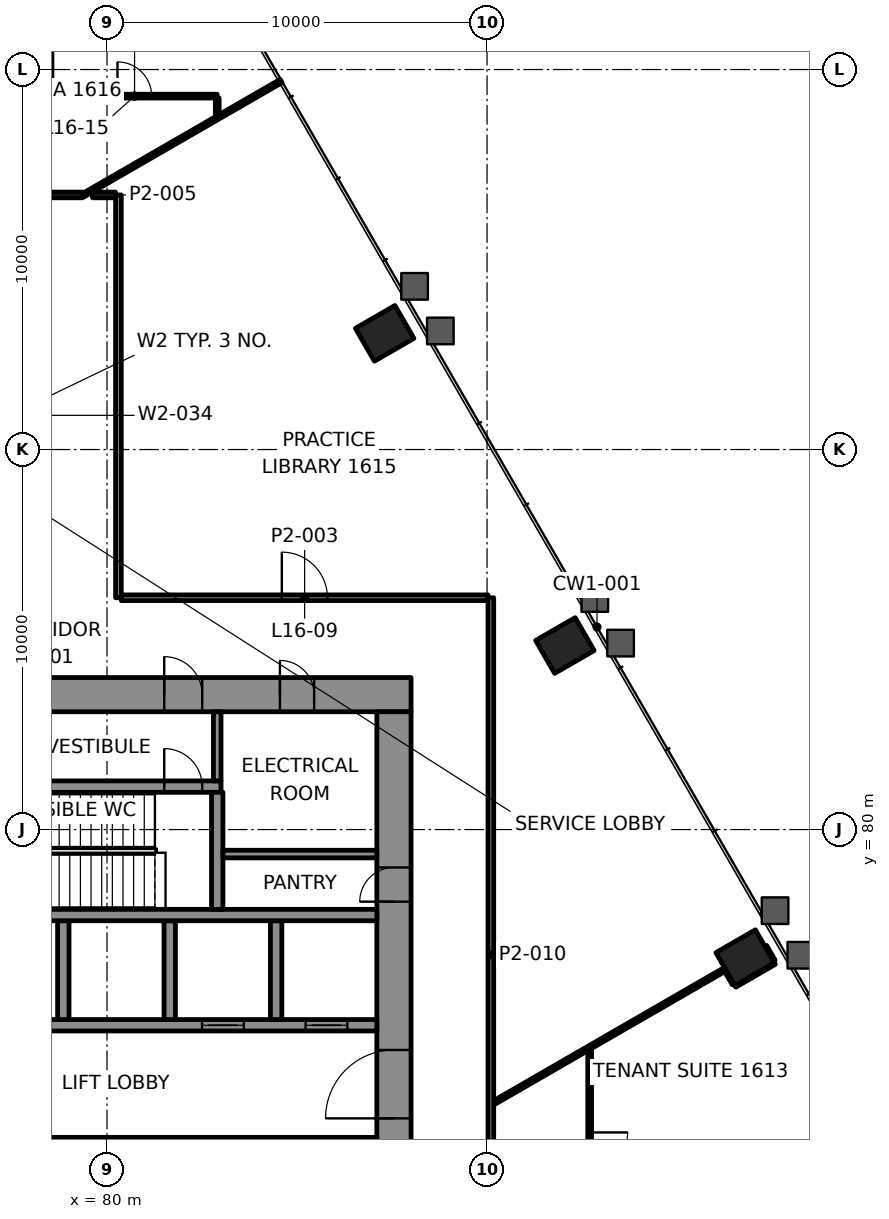
"""IFC4 building model, lengths in metres.
Left out: names, types, materials, properties, quantities, classifications, styles, units other than length and angle.
Written with IfcOpenShell. Run it as: python <this file> out.ifc"""

import sys

from ifc_helpers import new_model, si_unit, direction, frame, frame_2d, origin, origin_2d, place, context, subcontext, project, spatial, rectangle, extrude, element, fill, save


model = new_model("IFC4")
c1 = context("Model", 3, precision=1e-05, world=origin(), true_north=direction((0.0, 1.0)))
c2 = subcontext(c1, "Body", "Model", "MODEL_VIEW")
j1 = project(units=[si_unit("LENGTHUNIT", "METRE"), si_unit("PLANEANGLEUNIT", "RADIAN")], contexts=[c1])
p1 = place(None, origin())
s1 = spatial("IfcSite", under=j1, at=p1, CompositionType="ELEMENT")
p2 = place(p1, origin())
s2 = spatial("IfcBuilding", under=s1, at=p2, CompositionType="ELEMENT")
p3 = place(p2, frame((0.0, 0.0, 73.6)))
s3 = spatial("IfcBuildingStorey", under=s2, at=p3, CompositionType="ELEMENT", Elevation=73.6)
for number, where, z_axis, x_axis in (
    (1, (96.791, 76.628, -0.0), (0.0, 0.0, 1.0), (-0.5, 0.866, 0.0)),
    (2, (92.049, 84.843, -0.0), (0.0, 0.0, 1.0), (-0.5, 0.866, 0.0)),
    (3, (87.306, 93.057, -0.0), (0.0, 0.0, 1.0), (-0.5, 0.866, 0.0)),
):
    element("IfcColumn", number, at=place(p3, frame(where, z_axis=z_axis, x_axis=x_axis)), inside=s3, PredefinedType="COLUMN", context=c2, shape_type="SweptSolid", body=[
        extrude(rectangle(XDim=1.0, YDim=1.2, at=origin_2d()), origin(), (0.0, 0.0, 1.0), 4.2),
    ])
p4 = place(p3, frame((62.0, 83.55, 0.0), z_axis=(0.0, 0.0, 1.0), x_axis=(1.0, 0.0, 0.0)))
e4 = element("IfcWall", 4, at=p4, inside=s3, PredefinedType="SHEAR", context=c2, shape_type="SweptSolid", body=[
    extrude(rectangle(XDim=26.0, YDim=0.9, at=frame_2d((13.0, 0.0))), origin(), (0.0, 0.0, 1.0), 4.0),
])
p5 = place(p4, frame((5.695, 0.0, 0.0)))
e5 = element("IfcOpeningElement", 5, at=p5, cuts=e4, PredefinedType="OPENING", context=c2, shape_type="SweptSolid", body=[
    extrude(rectangle(XDim=1.0, YDim=2.1, at=frame_2d((0.5, 1.05))), frame((0.0, 0.46, 0.0), z_axis=(0.0, -1.0, 0.0), x_axis=(1.0, 0.0, 0.0)), (0.0, 0.0, 1.0), 0.92),
])
p6 = place(p4, frame((19.505, 0.0, 0.0)))
e6 = element("IfcOpeningElement", 6, at=p6, cuts=e4, PredefinedType="OPENING", context=c2, shape_type="SweptSolid", body=[
    extrude(rectangle(XDim=1.0, YDim=2.1, at=frame_2d((0.5, 1.05))), frame((0.0, 0.46, 0.0), z_axis=(0.0, -1.0, 0.0), x_axis=(1.0, 0.0, 0.0)), (0.0, 0.0, 1.0), 0.92),
])
p7 = place(p4, frame((3.45, 0.0, 0.0)))
e7 = element("IfcOpeningElement", 7, at=p7, cuts=e4, PredefinedType="OPENING", context=c2, shape_type="SweptSolid", body=[
    extrude(rectangle(XDim=0.9, YDim=2.1, at=frame_2d((0.45, 1.05))), frame((0.0, 0.46, 0.0), z_axis=(0.0, -1.0, 0.0), x_axis=(1.0, 0.0, 0.0)), (0.0, 0.0, 1.0), 0.92),
])
p8 = place(p4, frame((12.65, 0.0, 0.0)))
e8 = element("IfcOpeningElement", 8, at=p8, cuts=e4, PredefinedType="OPENING", context=c2, shape_type="SweptSolid", body=[
    extrude(rectangle(XDim=0.9, YDim=2.1, at=frame_2d((0.45, 1.05))), frame((0.0, 0.46, 0.0), z_axis=(0.0, -1.0, 0.0), x_axis=(1.0, 0.0, 0.0)), (0.0, 0.0, 1.0), 0.92),
])
p9 = place(p4, frame((22.55, 0.0, 0.0)))
e9 = element("IfcOpeningElement", 9, at=p9, cuts=e4, PredefinedType="OPENING", context=c2, shape_type="SweptSolid", body=[
    extrude(rectangle(XDim=0.9, YDim=2.1, at=frame_2d((0.45, 1.05))), frame((0.0, 0.46, 0.0), z_axis=(0.0, -1.0, 0.0), x_axis=(1.0, 0.0, 0.0)), (0.0, 0.0, 1.0), 0.92),
])
p10 = place(p3, frame((87.55, 66.9, 0.0), z_axis=(0.0, 0.0, 1.0), x_axis=(0.0, 1.0, 0.0)))
e10 = element("IfcWall", 10, at=p10, inside=s3, PredefinedType="SHEAR", context=c2, shape_type="SweptSolid", body=[
    extrude(rectangle(XDim=16.2, YDim=0.9, at=frame_2d((8.1, 0.0))), origin(), (0.0, 0.0, 1.0), 4.0),
])
p11 = place(p10, frame((5.5, 0.0, 0.0)))
e11 = element("IfcOpeningElement", 11, at=p11, cuts=e10, PredefinedType="OPENING", context=c2, shape_type="SweptSolid", body=[
    extrude(rectangle(XDim=1.8, YDim=2.1, at=frame_2d((0.9, 1.05))), frame((0.0, 0.46, 0.0), z_axis=(0.0, -1.0, 0.0), x_axis=(1.0, 0.0, 0.0)), (0.0, 0.0, 1.0), 0.92),
])
p12 = place(p10, frame((11.202, 0.0, 0.0)))
e12 = element("IfcOpeningElement", 12, at=p12, cuts=e10, PredefinedType="OPENING", context=c2, shape_type="SweptSolid", body=[
    extrude(rectangle(XDim=0.9, YDim=2.1, at=frame_2d((0.45, 1.05))), frame((0.0, 0.46, 0.0), z_axis=(0.0, -1.0, 0.0), x_axis=(1.0, 0.0, 0.0)), (0.0, 0.0, 1.0), 0.92),
])
p13 = place(p3, frame((70.3, 71.75, 0.0), z_axis=(0.0, 0.0, 1.0), x_axis=(1.0, 0.0, 0.0)))
e13 = element("IfcWall", 13, at=p13, inside=s3, PredefinedType="SHEAR", context=c2, shape_type="SweptSolid", body=[
    extrude(rectangle(XDim=16.8, YDim=0.3, at=frame_2d((8.4, 0.0))), origin(), (0.0, 0.0, 1.0), 4.0),
])
p14 = place(p13, frame((1.0, 0.0, 0.0)))
e14 = element("IfcOpeningElement", 14, at=p14, cuts=e13, PredefinedType="OPENING", context=c2, shape_type="SweptSolid", body=[
    extrude(rectangle(XDim=1.1, YDim=2.1, at=frame_2d((0.55, 1.05))), frame((0.0, 0.16, 0.0), z_axis=(0.0, -1.0, 0.0), x_axis=(1.0, 0.0, 0.0)), (0.0, 0.0, 1.0), 0.32),
])
p15 = place(p13, frame((3.8, 0.0, 0.0)))
e15 = element("IfcOpeningElement", 15, at=p15, cuts=e13, PredefinedType="OPENING", context=c2, shape_type="SweptSolid", body=[
    extrude(rectangle(XDim=1.1, YDim=2.1, at=frame_2d((0.55, 1.05))), frame((0.0, 0.16, 0.0), z_axis=(0.0, -1.0, 0.0), x_axis=(1.0, 0.0, 0.0)), (0.0, 0.0, 1.0), 0.32),
])
p16 = place(p13, frame((6.6, 0.0, 0.0)))
e16 = element("IfcOpeningElement", 16, at=p16, cuts=e13, PredefinedType="OPENING", context=c2, shape_type="SweptSolid", body=[
    extrude(rectangle(XDim=1.1, YDim=2.1, at=frame_2d((0.55, 1.05))), frame((0.0, 0.16, 0.0), z_axis=(0.0, -1.0, 0.0), x_axis=(1.0, 0.0, 0.0)), (0.0, 0.0, 1.0), 0.32),
])
p17 = place(p13, frame((9.4, 0.0, 0.0)))
e17 = element("IfcOpeningElement", 17, at=p17, cuts=e13, PredefinedType="OPENING", context=c2, shape_type="SweptSolid", body=[
    extrude(rectangle(XDim=1.1, YDim=2.1, at=frame_2d((0.55, 1.05))), frame((0.0, 0.16, 0.0), z_axis=(0.0, -1.0, 0.0), x_axis=(1.0, 0.0, 0.0)), (0.0, 0.0, 1.0), 0.32),
])
p18 = place(p13, frame((12.2, 0.0, 0.0)))
e18 = element("IfcOpeningElement", 18, at=p18, cuts=e13, PredefinedType="OPENING", context=c2, shape_type="SweptSolid", body=[
    extrude(rectangle(XDim=1.1, YDim=2.1, at=frame_2d((0.55, 1.05))), frame((0.0, 0.16, 0.0), z_axis=(0.0, -1.0, 0.0), x_axis=(1.0, 0.0, 0.0)), (0.0, 0.0, 1.0), 0.32),
])
p19 = place(p13, frame((14.925, 0.0, 0.0)))
e19 = element("IfcOpeningElement", 19, at=p19, cuts=e13, PredefinedType="OPENING", context=c2, shape_type="SweptSolid", body=[
    extrude(rectangle(XDim=1.1, YDim=2.1, at=frame_2d((0.55, 1.05))), frame((0.0, 0.16, 0.0), z_axis=(0.0, -1.0, 0.0), x_axis=(1.0, 0.0, 0.0)), (0.0, 0.0, 1.0), 0.32),
])
p20 = place(p3, frame((70.3, 74.85, 0.0), z_axis=(0.0, 0.0, 1.0), x_axis=(1.0, 0.0, 0.0)))
e20 = element("IfcWall", 20, at=p20, inside=s3, PredefinedType="SHEAR", context=c2, shape_type="SweptSolid", body=[
    extrude(rectangle(XDim=16.8, YDim=0.3, at=frame_2d((8.4, 0.0))), origin(), (0.0, 0.0, 1.0), 4.0),
])
p21 = place(p20, frame((3.8, 0.0, 0.0)))
e21 = element("IfcOpeningElement", 21, at=p21, cuts=e20, PredefinedType="OPENING", context=c2, shape_type="SweptSolid", body=[
    extrude(rectangle(XDim=1.1, YDim=2.1, at=frame_2d((0.55, 1.05))), frame((0.0, 0.16, 0.0), z_axis=(0.0, -1.0, 0.0), x_axis=(1.0, 0.0, 0.0)), (0.0, 0.0, 1.0), 0.32),
])
p22 = place(p20, frame((12.2, 0.0, 0.0)))
e22 = element("IfcOpeningElement", 22, at=p22, cuts=e20, PredefinedType="OPENING", context=c2, shape_type="SweptSolid", body=[
    extrude(rectangle(XDim=1.1, YDim=2.1, at=frame_2d((0.55, 1.05))), frame((0.0, 0.16, 0.0), z_axis=(0.0, -1.0, 0.0), x_axis=(1.0, 0.0, 0.0)), (0.0, 0.0, 1.0), 0.32),
])
p23 = place(p20, frame((14.925, 0.0, 0.0)))
e23 = element("IfcOpeningElement", 23, at=p23, cuts=e20, PredefinedType="OPENING", context=c2, shape_type="SweptSolid", body=[
    extrude(rectangle(XDim=1.1, YDim=2.1, at=frame_2d((0.55, 1.05))), frame((0.0, 0.16, 0.0), z_axis=(0.0, -1.0, 0.0), x_axis=(1.0, 0.0, 0.0)), (0.0, 0.0, 1.0), 0.32),
])
for number, where, z_axis, x_axis in (
    (24, (78.85, 75.0, 0.0), (0.0, 0.0, 1.0), (0.0, 1.0, 0.0)),
    (25, (81.65, 75.0, 0.0), (0.0, 0.0, 1.0), (0.0, 1.0, 0.0)),
    (26, (84.45, 75.0, 0.0), (0.0, 0.0, 1.0), (0.0, 1.0, 0.0)),
):
    element("IfcWall", number, at=place(p3, frame(where, z_axis=z_axis, x_axis=x_axis)), inside=s3, PredefinedType="SHEAR", context=c2, shape_type="SweptSolid", body=[
        extrude(rectangle(XDim=2.6, YDim=0.3, at=frame_2d((1.3, 0.0))), origin(), (0.0, 0.0, 1.0), 4.0),
    ])
p24 = place(p3, frame((64.35, 77.75, 0.0), z_axis=(0.0, 0.0, 1.0), x_axis=(1.0, 0.0, 0.0)))
e27 = element("IfcWall", 27, at=p24, inside=s3, PredefinedType="SHEAR", context=c2, shape_type="SweptSolid", body=[
    extrude(rectangle(XDim=22.75, YDim=0.3, at=frame_2d((11.375, 0.0))), origin(), (0.0, 0.0, 1.0), 4.0),
])
p25 = place(p24, frame((3.345, 0.0, 0.0)))
e28 = element("IfcOpeningElement", 28, at=p25, cuts=e27, PredefinedType="OPENING", context=c2, shape_type="SweptSolid", body=[
    extrude(rectangle(XDim=1.0, YDim=2.1, at=frame_2d((0.5, 1.05))), frame((0.0, 0.16, 0.0), z_axis=(0.0, -1.0, 0.0), x_axis=(1.0, 0.0, 0.0)), (0.0, 0.0, 1.0), 0.32),
])
p26 = place(p3, frame((76.14, 81.13, 0.0), z_axis=(0.0, 0.0, 1.0), x_axis=(1.0, 0.0, 0.0)))
e29 = element("IfcWall", 29, at=p26, inside=s3, PredefinedType="SHEAR", context=c2, shape_type="SweptSolid", body=[
    extrude(rectangle(XDim=6.86, YDim=0.3, at=frame_2d((3.43, 0.0))), origin(), (0.0, 0.0, 1.0), 4.0),
])
p27 = place(p26, frame((5.365, 0.0, 0.0)))
e30 = element("IfcOpeningElement", 30, at=p27, cuts=e29, PredefinedType="OPENING", context=c2, shape_type="SweptSolid", body=[
    extrude(rectangle(XDim=1.0, YDim=2.1, at=frame_2d((0.5, 1.05))), frame((0.0, 0.16, 0.0), z_axis=(0.0, -1.0, 0.0), x_axis=(1.0, 0.0, 0.0)), (0.0, 0.0, 1.0), 0.32),
])
p28 = place(p3, frame((82.9, 77.9, 0.0), z_axis=(0.0, 0.0, 1.0), x_axis=(0.0, 1.0, 0.0)))
e31 = element("IfcWall", 31, at=p28, inside=s3, PredefinedType="SHEAR", context=c2, shape_type="SweptSolid", body=[
    extrude(rectangle(XDim=3.08, YDim=0.3, at=frame_2d((1.54, 0.0))), origin(), (0.0, 0.0, 1.0), 4.0),
])
p29 = place(p3, frame((80.375, 86.1, 0.0), z_axis=(0.0, 0.0, 1.0), x_axis=(1.0, 0.0, 0.0)))
e32 = element("IfcWall", 32, at=p29, inside=s3, PredefinedType="PARTITIONING", context=c2, shape_type="SweptSolid", body=[
    extrude(rectangle(XDim=9.649, YDim=0.15, at=frame_2d((4.825, 0.0))), origin(), (0.0, 0.0, 1.0), 3.4),
])
p30 = place(p29, frame((4.225, 0.0, 0.0)))
e33 = element("IfcOpeningElement", 33, at=p30, cuts=e32, PredefinedType="OPENING", context=c2, shape_type="SweptSolid", body=[
    extrude(rectangle(XDim=1.2, YDim=2.1, at=frame_2d((0.6, 1.05))), frame((0.0, 0.085, 0.0), z_axis=(0.0, -1.0, 0.0), x_axis=(1.0, 0.0, 0.0)), (0.0, 0.0, 1.0), 0.17),
])
p31 = place(p3, frame((75.975, 96.7, 0.0), z_axis=(0.0, 0.0, 1.0), x_axis=(1.0, 0.0, 0.0)))
e34 = element("IfcWall", 34, at=p31, inside=s3, PredefinedType="PARTITIONING", context=c2, shape_type="SweptSolid", body=[
    extrude(rectangle(XDim=3.387, YDim=0.15, at=frame_2d((1.693, 0.0))), origin(), (0.0, 0.0, 1.0), 3.4),
])
p32 = place(p31, frame((1.194, 0.0, 0.0)))
e35 = element("IfcOpeningElement", 35, at=p32, cuts=e34, PredefinedType="OPENING", context=c2, shape_type="SweptSolid", body=[
    extrude(rectangle(XDim=1.0, YDim=2.1, at=frame_2d((0.5, 1.05))), frame((0.0, 0.085, 0.0), z_axis=(0.0, -1.0, 0.0), x_axis=(1.0, 0.0, 0.0)), (0.0, 0.0, 1.0), 0.17),
])
p33 = place(p3, frame((78.55, 99.3, 0.0), z_axis=(0.0, 0.0, 1.0), x_axis=(1.0, 0.0, 0.0)))
e36 = element("IfcWall", 36, at=p33, inside=s3, PredefinedType="PARTITIONING", context=c2, shape_type="SweptSolid", body=[
    extrude(rectangle(XDim=4.349, YDim=0.1, at=frame_2d((2.175, 0.0))), origin(), (0.0, 0.0, 1.0), 3.4),
])
p34 = place(p33, frame((1.725, 0.0, 0.0)))
e37 = element("IfcOpeningElement", 37, at=p34, cuts=e36, PredefinedType="OPENING", context=c2, shape_type="SweptSolid", body=[
    extrude(rectangle(XDim=0.9, YDim=2.1, at=frame_2d((0.45, 1.05))), frame((0.0, 0.06, 0.0), z_axis=(0.0, -1.0, 0.0), x_axis=(1.0, 0.0, 0.0)), (0.0, 0.0, 1.0), 0.12),
])
p35 = place(p3, frame((96.522, 75.896, 0.0), z_axis=(0.0, 0.0, 1.0), x_axis=(0.865978732077, 0.500080829057, 0.0)))
e38 = element("IfcWall", 38, at=p35, inside=s3, PredefinedType="PARTITIONING", context=c2, shape_type="SweptSolid", body=[
    extrude(rectangle(XDim=1.199, YDim=0.1, at=frame_2d((0.6, 0.0))), origin(), (0.0, 0.0, 1.0), 3.165),
])
p36 = place(p3, frame((90.201, 72.824, 0.0), z_axis=(0.0, 0.0, 1.0), x_axis=(0.866028979627, 0.499993806408, 0.0)))
e39 = element("IfcWall", 39, at=p36, inside=s3, PredefinedType="PARTITIONING", context=c2, shape_type="SweptSolid", body=[
    extrude(rectangle(XDim=7.009, YDim=0.1, at=frame_2d((3.505, 0.0))), origin(), (0.0, 0.0, 1.0), 3.4),
])
p37 = place(p3, frame((79.387, 96.7, 0.0), z_axis=(0.0, 0.0, 1.0), x_axis=(0.866032365835, 0.499987941182, 0.0)))
e40 = element("IfcWall", 40, at=p37, inside=s3, PredefinedType="PARTITIONING", context=c2, shape_type="SweptSolid", body=[
    extrude(rectangle(XDim=5.997, YDim=0.1, at=frame_2d((2.999, 0.0))), origin(), (0.0, 0.0, 1.0), 3.165),
])
p38 = place(p3, frame((92.7, 74.179, 0.0), z_axis=(0.0, 0.0, 1.0), x_axis=(0.0, -1.0, 0.0)))
e41 = element("IfcWall", 41, at=p38, inside=s3, PredefinedType="PARTITIONING", context=c2, shape_type="SweptSolid", body=[
    extrude(rectangle(XDim=5.299, YDim=0.1, at=frame_2d((2.649, 0.0))), origin(), (0.0, 0.0, 1.0), 3.4),
])
p39 = place(p38, frame((2.149, 0.0, 0.0)))
e42 = element("IfcOpeningElement", 42, at=p39, cuts=e41, PredefinedType="OPENING", context=c2, shape_type="SweptSolid", body=[
    extrude(rectangle(XDim=1.0, YDim=2.1, at=frame_2d((0.5, 1.05))), frame((0.0, 0.06, 0.0), z_axis=(0.0, -1.0, 0.0), x_axis=(1.0, 0.0, 0.0)), (0.0, 0.0, 1.0), 0.12),
])
p40 = place(p3, frame((90.1, 86.099, 0.0), z_axis=(0.0, 0.0, 1.0), x_axis=(0.0, -1.0, 0.0)))
e43 = element("IfcWall", 43, at=p40, inside=s3, PredefinedType="PARTITIONING", context=c2, shape_type="SweptSolid", body=[
    extrude(rectangle(XDim=18.778, YDim=0.15, at=frame_2d((9.389, 0.0))), origin(), (0.0, 0.0, 1.0), 3.4),
])
p41 = place(p40, frame((15.455, 0.0, 0.0)))
e44 = element("IfcOpeningElement", 44, at=p41, cuts=e43, PredefinedType="OPENING", context=c2, shape_type="SweptSolid", body=[
    extrude(rectangle(XDim=1.0, YDim=2.1, at=frame_2d((0.5, 1.05))), frame((0.0, 0.085, 0.0), z_axis=(0.0, -1.0, 0.0), x_axis=(1.0, 0.0, 0.0)), (0.0, 0.0, 1.0), 0.17),
])
p42 = place(p3, frame((82.9, 98.816, 0.0), z_axis=(0.0, 0.0, 1.0), x_axis=(0.0, 1.0, 0.0)))
e45 = element("IfcWall", 45, at=p42, inside=s3, PredefinedType="PARTITIONING", context=c2, shape_type="SweptSolid", body=[
    extrude(rectangle(XDim=0.433, YDim=0.1, at=frame_2d((0.217, 0.0))), origin(), (0.0, 0.0, 1.0), 3.4),
])
p43 = place(p3, frame((80.3, 86.1, 0.0), z_axis=(0.0, 0.0, 1.0), x_axis=(0.0, 1.0, 0.0)))
e46 = element("IfcWall", 46, at=p43, inside=s3, PredefinedType="PARTITIONING", context=c2, shape_type="SweptSolid", body=[
    extrude(rectangle(XDim=10.599, YDim=0.15, at=frame_2d((5.3, 0.0))), origin(), (0.0, 0.0, 1.0), 3.4),
])
p44 = place(p3, frame((97.536, 76.539, 0.0), z_axis=(0.0, 0.0, 1.0), x_axis=(-0.499879237999, 0.866095114533, 0.0)))
e47 = element("IfcWall", 47, at=p44, inside=s3, PredefinedType="PARTITIONING", context=c2, shape_type="SweptSolid", body=[
    extrude(rectangle(XDim=0.449, YDim=0.1, at=frame_2d((0.225, 0.0))), origin(), (0.0, 0.0, 1.0), 3.4),
])
p45 = place(p3, frame((96.496, 75.939, 0.0), z_axis=(0.0, 0.0, 1.0), x_axis=(-0.499757756434, 0.866165218006, 0.0)))
e48 = element("IfcWall", 48, at=p45, inside=s3, PredefinedType="PARTITIONING", context=c2, shape_type="SweptSolid", body=[
    extrude(rectangle(XDim=0.399, YDim=0.1, at=frame_2d((0.2, 0.0))), origin(), (0.0, 0.0, 1.0), 3.4),
])
p46 = place(p3, frame((79.617, 96.7, 0.0), z_axis=(0.0, 0.0, 1.0), x_axis=(1.0, 0.0, 0.0)))
e49 = element("IfcWall", 49, at=p46, inside=s3, PredefinedType="PARTITIONING", context=c2, shape_type="SweptSolid", body=[
    extrude(rectangle(XDim=0.607, YDim=0.15, at=frame_2d((0.304, 0.0))), origin(), (0.0, 0.0, 1.0), 3.4),
])
p47 = place(p3, frame((83.05, 79.355, 0.0), z_axis=(0.0, 0.0, 1.0), x_axis=(1.0, 0.0, 0.0)))
e50 = element("IfcWall", 50, at=p47, inside=s3, PredefinedType="PARTITIONING", context=c2, shape_type="SweptSolid", body=[
    extrude(rectangle(XDim=4.05, YDim=0.2, at=frame_2d((2.025, 0.0))), origin(), (0.0, 0.0, 1.0), 4.0),
])
p48 = place(p3, frame((82.9, 81.28, 0.0), z_axis=(0.0, 0.0, 1.0), x_axis=(0.0, 1.0, 0.0)))
e51 = element("IfcWall", 51, at=p48, inside=s3, PredefinedType="PARTITIONING", context=c2, shape_type="SweptSolid", body=[
    extrude(rectangle(XDim=1.82, YDim=0.2, at=frame_2d((0.91, 0.0))), origin(), (0.0, 0.0, 1.0), 4.0),
])
p49 = place(p30, origin())
e52 = element("IfcDoor", 52, at=p49, inside=s3, OperationType="DOUBLE_DOOR_SINGLE_SWING", PredefinedType="DOOR", context=c2, shape_type="SweptSolid", body=[
    extrude(rectangle(XDim=1.2, YDim=2.1, at=frame_2d((0.6, 1.05))), frame((0.0, 0.025, 0.0), z_axis=(0.0, -1.0, 0.0), x_axis=(1.0, 0.0, 0.0)), (0.0, 0.0, 1.0), 0.05),
])
fill(e33, e52)
p50 = place(p34, origin())
e53 = element("IfcDoor", 53, at=p50, inside=s3, OperationType="SINGLE_SWING_RIGHT", PredefinedType="DOOR", context=c2, shape_type="SweptSolid", body=[
    extrude(rectangle(XDim=0.9, YDim=2.1, at=frame_2d((0.45, 1.05))), frame((0.0, 0.025, 0.0), z_axis=(0.0, -1.0, 0.0), x_axis=(1.0, 0.0, 0.0)), (0.0, 0.0, 1.0), 0.05),
])
fill(e37, e53)
p51 = place(p39, origin())
e54 = element("IfcDoor", 54, at=p51, inside=s3, OperationType="SINGLE_SWING_LEFT", PredefinedType="DOOR", context=c2, shape_type="SweptSolid", body=[
    extrude(rectangle(XDim=1.0, YDim=2.1, at=frame_2d((0.5, 1.05))), frame((0.0, 0.025, 0.0), z_axis=(0.0, -1.0, 0.0), x_axis=(1.0, 0.0, 0.0)), (0.0, 0.0, 1.0), 0.05),
])
fill(e42, e54)
p52 = place(p22, origin())
e55 = element("IfcDoor", 55, at=p52, inside=s3, OperationType="DOUBLE_DOOR_SLIDING", PredefinedType="DOOR", context=c2, shape_type="SweptSolid", body=[
    extrude(rectangle(XDim=1.1, YDim=2.1, at=frame_2d((0.55, 1.05))), frame((0.0, 0.025, 0.0), z_axis=(0.0, -1.0, 0.0), x_axis=(1.0, 0.0, 0.0)), (0.0, 0.0, 1.0), 0.05),
])
fill(e22, e55)
p53 = place(p23, origin())
e56 = element("IfcDoor", 56, at=p53, inside=s3, OperationType="DOUBLE_DOOR_SLIDING", PredefinedType="DOOR", context=c2, shape_type="SweptSolid", body=[
    extrude(rectangle(XDim=1.1, YDim=2.1, at=frame_2d((0.55, 1.05))), frame((0.0, 0.025, 0.0), z_axis=(0.0, -1.0, 0.0), x_axis=(1.0, 0.0, 0.0)), (0.0, 0.0, 1.0), 0.05),
])
fill(e23, e56)
p54 = place(p27, origin())
e57 = element("IfcDoor", 57, at=p54, inside=s3, OperationType="SINGLE_SWING_RIGHT", PredefinedType="DOOR", context=c2, shape_type="SweptSolid", body=[
    extrude(rectangle(XDim=1.0, YDim=2.1, at=frame_2d((0.5, 1.05))), frame((0.0, 0.025, 0.0), z_axis=(0.0, -1.0, 0.0), x_axis=(1.0, 0.0, 0.0)), (0.0, 0.0, 1.0), 0.05),
])
fill(e30, e57)
p55 = place(p6, origin())
e58 = element("IfcDoor", 58, at=p55, inside=s3, OperationType="SINGLE_SWING_LEFT", PredefinedType="DOOR", context=c2, shape_type="SweptSolid", body=[
    extrude(rectangle(XDim=1.0, YDim=2.1, at=frame_2d((0.5, 1.05))), frame((0.0, 0.17, 0.0), z_axis=(0.0, -1.0, 0.0), x_axis=(1.0, 0.0, 0.0)), (0.0, 0.0, 1.0), 0.34),
])
fill(e6, e58)
p56 = place(p11, origin())
e59 = element("IfcDoor", 59, at=p56, inside=s3, OperationType="SINGLE_SWING_RIGHT", PredefinedType="DOOR", context=c2, shape_type="SweptSolid", body=[
    extrude(rectangle(XDim=1.8, YDim=2.1, at=frame_2d((0.9, 1.05))), frame((0.0, 0.17, 0.0), z_axis=(0.0, -1.0, 0.0), x_axis=(1.0, 0.0, 0.0)), (0.0, 0.0, 1.0), 0.34),
])
fill(e11, e59)
p57 = place(p12, origin())
e60 = element("IfcDoor", 60, at=p57, inside=s3, OperationType="SINGLE_SWING_RIGHT", PredefinedType="DOOR", context=c2, shape_type="SweptSolid", body=[
    extrude(rectangle(XDim=0.9, YDim=2.1, at=frame_2d((0.45, 1.05))), frame((0.0, 0.17, 0.0), z_axis=(0.0, -1.0, 0.0), x_axis=(1.0, 0.0, 0.0)), (0.0, 0.0, 1.0), 0.34),
])
fill(e12, e60)
p58 = place(p9, origin())
e61 = element("IfcDoor", 61, at=p58, inside=s3, OperationType="SINGLE_SWING_LEFT", PredefinedType="DOOR", context=c2, shape_type="SweptSolid", body=[
    extrude(rectangle(XDim=0.9, YDim=2.1, at=frame_2d((0.45, 1.05))), frame((0.0, 0.17, 0.0), z_axis=(0.0, -1.0, 0.0), x_axis=(1.0, 0.0, 0.0)), (0.0, 0.0, 1.0), 0.34),
])
fill(e9, e61)
save(model, sys.argv[1])
